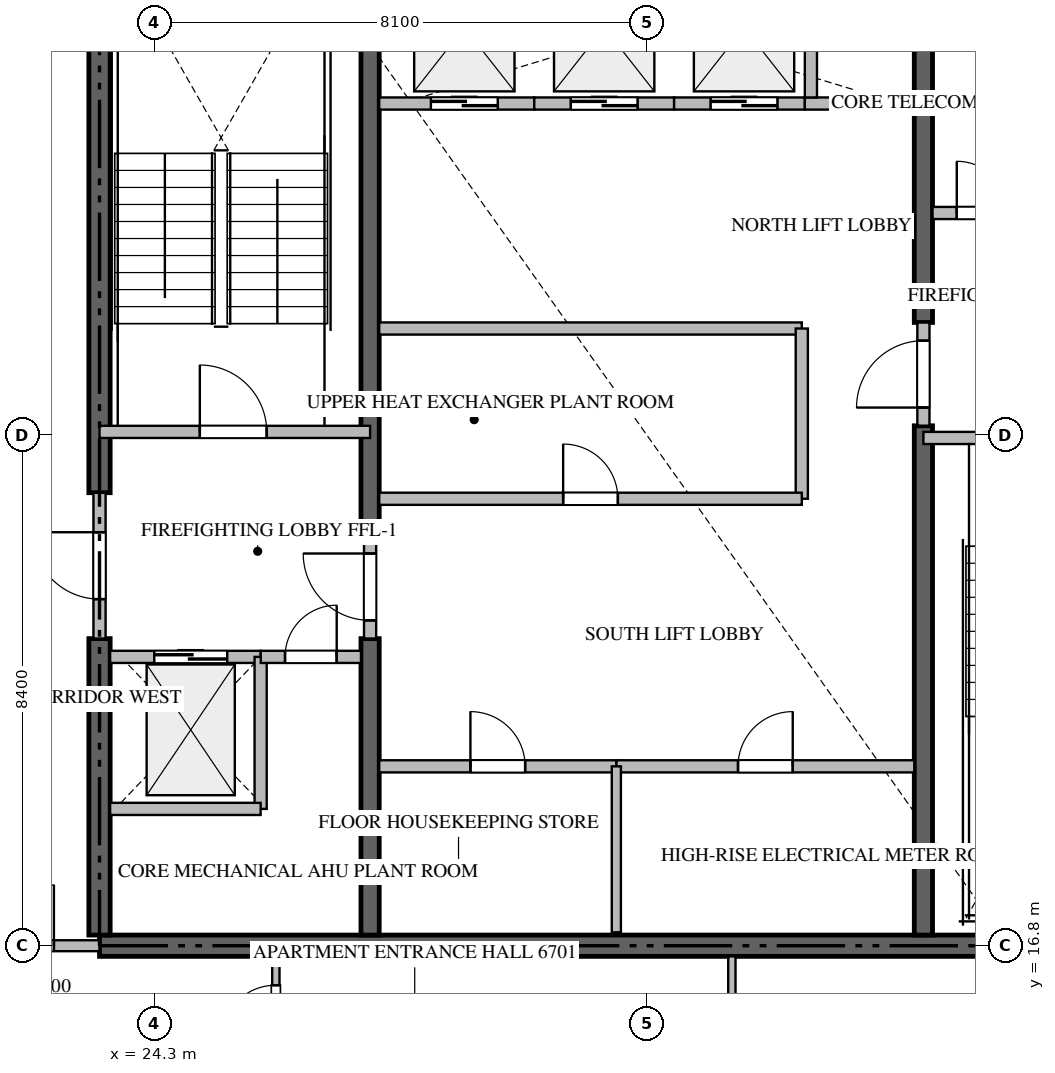
"""IFC4 building model, lengths in metres.
Left out: names, types, materials, properties, quantities, classifications, styles, units other than length and angle.
Written with IfcOpenShell. Run it as: python <this file> out.ifc"""

import sys

from ifc_helpers import new_model, si_unit, direction, frame, frame_2d, origin, place, context, subcontext, project, spatial, rectangle, extrude, source, transform, mapped, element, fill, save


model = new_model("IFC4")
c1 = context("Model", 3, precision=1e-05, world=origin(), true_north=direction((0.0, 1.0)))
c2 = subcontext(c1, "Body", "Model", "MODEL_VIEW")
j1 = project(units=[si_unit("LENGTHUNIT", "METRE"), si_unit("PLANEANGLEUNIT", "RADIAN")], contexts=[c1])
p1 = place(None, origin())
s1 = spatial("IfcSite", under=j1, at=p1, CompositionType="ELEMENT")
p2 = place(p1, origin())
s2 = spatial("IfcBuilding", under=s1, at=p2, CompositionType="ELEMENT")
p3 = place(p2, frame((0.0, 0.0, 268.2)))
s3 = spatial("IfcBuildingStorey", under=s2, at=p3, CompositionType="ELEMENT", Elevation=268.2)
p4 = place(p3, frame((23.4, 16.8, -0.26), z_axis=(0.0, 0.0, 1.0), x_axis=(1.0, 0.0, 0.0)))
e1 = element("IfcWall", 1, at=p4, inside=s3, PredefinedType="SHEAR", context=c2, shape_type="SweptSolid", body=[
    extrude(rectangle(XDim=18.0, YDim=0.35, at=frame_2d((9.0, 0.0))), origin(), (0.0, 0.0, 1.0), 3.848),
])
p5 = place(p3, frame((23.4, 16.975, -0.26), z_axis=(0.0, 0.0, 1.0), x_axis=(0.0, 1.0, 0.0)))
e2 = element("IfcWall", 2, at=p5, inside=s3, PredefinedType="SHEAR", context=c2, shape_type="SweptSolid", body=[
    extrude(rectangle(XDim=4.875, YDim=0.35, at=frame_2d((2.438, 0.0))), origin(), (0.0, 0.0, 1.0), 3.848),
])
p6 = place(p3, frame((23.4, 24.25, -0.26), z_axis=(0.0, 0.0, 1.0), x_axis=(0.0, 1.0, 0.0)))
e3 = element("IfcWall", 3, at=p6, inside=s3, PredefinedType="SHEAR", context=c2, shape_type="SweptSolid", body=[
    extrude(rectangle(XDim=9.175, YDim=0.35, at=frame_2d((4.587, 0.0))), origin(), (0.0, 0.0, 1.0), 3.848),
])
p7 = place(p3, frame((27.85, 16.975, -0.26), z_axis=(0.0, 0.0, 1.0), x_axis=(0.0, 1.0, 0.0)))
e4 = element("IfcWall", 4, at=p7, inside=s3, PredefinedType="SHEAR", context=c2, shape_type="SweptSolid", body=[
    extrude(rectangle(XDim=4.875, YDim=0.3, at=frame_2d((2.438, 0.0))), origin(), (0.0, 0.0, 1.0), 3.848),
])
p8 = place(p3, frame((27.85, 23.55, -0.26), z_axis=(0.0, 0.0, 1.0), x_axis=(0.0, 1.0, 0.0)))
e5 = element("IfcWall", 5, at=p8, inside=s3, PredefinedType="SHEAR", context=c2, shape_type="SweptSolid", body=[
    extrude(rectangle(XDim=9.875, YDim=0.3, at=frame_2d((4.938, 0.0))), origin(), (0.0, 0.0, 1.0), 3.848),
])
p9 = place(p3, frame((36.95, 16.975, -0.26), z_axis=(0.0, 0.0, 1.0), x_axis=(0.0, 1.0, 0.0)))
e6 = element("IfcWall", 6, at=p9, inside=s3, PredefinedType="SHEAR", context=c2, shape_type="SweptSolid", body=[
    extrude(rectangle(XDim=8.375, YDim=0.3, at=frame_2d((4.188, 0.0))), origin(), (0.0, 0.0, 1.0), 3.848),
])
p10 = place(p3, frame((36.95, 27.05, -0.26), z_axis=(0.0, 0.0, 1.0), x_axis=(0.0, 1.0, 0.0)))
e7 = element("IfcWall", 7, at=p10, inside=s3, PredefinedType="SHEAR", context=c2, shape_type="SweptSolid", body=[
    extrude(rectangle(XDim=6.375, YDim=0.3, at=frame_2d((3.188, 0.0))), origin(), (0.0, 0.0, 1.0), 3.848),
])
p11 = place(p3, frame((23.4, 25.25, 0.0), z_axis=(0.0, 0.0, 1.0), x_axis=(1.0, 0.0, 0.0)))
e8 = element("IfcWall", 8, at=p11, inside=s3, PredefinedType="STANDARD", context=c2, shape_type="SweptSolid", body=[
    extrude(rectangle(XDim=4.45, YDim=0.2, at=frame_2d((2.225, 0.0))), origin(), (0.0, 0.0, 1.0), 3.59),
])
p12 = place(p11, frame((1.65, 0.0, 0.0)))
e9 = element("IfcOpeningElement", 9, at=p12, cuts=e8, PredefinedType="OPENING", context=c2, shape_type="SweptSolid", body=[
    extrude(rectangle(XDim=1.1, YDim=2.15, at=frame_2d((0.55, 1.075))), frame((0.0, 0.11, 0.0), z_axis=(0.0, -1.0, 0.0), x_axis=(1.0, 0.0, 0.0)), (0.0, 0.0, 1.0), 0.22),
])
p13 = place(p3, frame((36.95, 25.15, 0.0), z_axis=(0.0, 0.0, 1.0), x_axis=(1.0, 0.0, 0.0)))
e10 = element("IfcWall", 10, at=p13, inside=s3, PredefinedType="STANDARD", context=c2, shape_type="SweptSolid", body=[
    extrude(rectangle(XDim=4.45, YDim=0.2, at=frame_2d((2.225, 0.0))), origin(), (0.0, 0.0, 1.0), 3.59),
])
p14 = place(p13, frame((1.65, 0.0, 0.0)))
e11 = element("IfcOpeningElement", 11, at=p14, cuts=e10, PredefinedType="OPENING", context=c2, shape_type="SweptSolid", body=[
    extrude(rectangle(XDim=1.1, YDim=2.15, at=frame_2d((0.55, 1.075))), frame((0.0, 0.11, 0.0), z_axis=(0.0, -1.0, 0.0), x_axis=(1.0, 0.0, 0.0)), (0.0, 0.0, 1.0), 0.22),
])
p15 = place(p3, frame((23.575, 21.55, 0.0), z_axis=(0.0, 0.0, 1.0), x_axis=(1.0, 0.0, 0.0)))
e12 = element("IfcWall", 12, at=p15, inside=s3, PredefinedType="STANDARD", context=c2, shape_type="SweptSolid", body=[
    extrude(rectangle(XDim=2.475, YDim=0.2, at=frame_2d((1.238, 0.0))), origin(), (0.0, 0.0, 1.0), 3.59),
])
p16 = place(p15, frame((0.725, 0.0, 0.0)))
e13 = element("IfcOpeningElement", 13, at=p16, cuts=e12, PredefinedType="OPENING", context=c2, shape_type="SweptSolid", body=[
    extrude(rectangle(XDim=1.2, YDim=2.2, at=frame_2d((0.6, 1.1))), frame((0.0, 0.11, 0.0), z_axis=(0.0, -1.0, 0.0), x_axis=(1.0, 0.0, 0.0)), (0.0, 0.0, 1.0), 0.22),
])
p17 = place(p3, frame((28.0, 30.65, 0.0), z_axis=(0.0, 0.0, 1.0), x_axis=(1.0, 0.0, 0.0)))
e14 = element("IfcWall", 14, at=p17, inside=s3, PredefinedType="STANDARD", context=c2, shape_type="SweptSolid", body=[
    extrude(rectangle(XDim=2.55, YDim=0.2, at=frame_2d((1.275, 0.0))), origin(), (0.0, 0.0, 1.0), 3.59),
])
p18 = place(p17, frame((0.85, 0.0, 0.0)))
e15 = element("IfcOpeningElement", 15, at=p18, cuts=e14, PredefinedType="OPENING", context=c2, shape_type="SweptSolid", body=[
    extrude(rectangle(XDim=1.1, YDim=2.2, at=frame_2d((0.55, 1.1))), frame((0.0, 0.11, 0.0), z_axis=(0.0, -1.0, 0.0), x_axis=(1.0, 0.0, 0.0)), (0.0, 0.0, 1.0), 0.22),
])
p19 = place(p3, frame((30.55, 30.65, 0.0), z_axis=(0.0, 0.0, 1.0), x_axis=(1.0, 0.0, 0.0)))
e16 = element("IfcWall", 16, at=p19, inside=s3, PredefinedType="STANDARD", context=c2, shape_type="SweptSolid", body=[
    extrude(rectangle(XDim=2.3, YDim=0.2, at=frame_2d((1.15, 0.0))), origin(), (0.0, 0.0, 1.0), 3.59),
])
p20 = place(p19, frame((0.6, 0.0, 0.0)))
e17 = element("IfcOpeningElement", 17, at=p20, cuts=e16, PredefinedType="OPENING", context=c2, shape_type="SweptSolid", body=[
    extrude(rectangle(XDim=1.1, YDim=2.2, at=frame_2d((0.55, 1.1))), frame((0.0, 0.11, 0.0), z_axis=(0.0, -1.0, 0.0), x_axis=(1.0, 0.0, 0.0)), (0.0, 0.0, 1.0), 0.22),
])
p21 = place(p3, frame((32.85, 30.65, 0.0), z_axis=(0.0, 0.0, 1.0), x_axis=(1.0, 0.0, 0.0)))
e18 = element("IfcWall", 18, at=p21, inside=s3, PredefinedType="STANDARD", context=c2, shape_type="SweptSolid", body=[
    extrude(rectangle(XDim=2.15, YDim=0.2, at=frame_2d((1.075, 0.0))), origin(), (0.0, 0.0, 1.0), 3.59),
])
p22 = place(p21, frame((0.6, 0.0, 0.0)))
e19 = element("IfcOpeningElement", 19, at=p22, cuts=e18, PredefinedType="OPENING", context=c2, shape_type="SweptSolid", body=[
    extrude(rectangle(XDim=1.1, YDim=2.2, at=frame_2d((0.55, 1.1))), frame((0.0, 0.11, 0.0), z_axis=(0.0, -1.0, 0.0), x_axis=(1.0, 0.0, 0.0)), (0.0, 0.0, 1.0), 0.22),
])
p23 = place(p3, frame((35.0, 30.65, 0.0), z_axis=(0.0, 0.0, 1.0), x_axis=(1.0, 0.0, 0.0)))
e20 = element("IfcWall", 20, at=p23, inside=s3, PredefinedType="STANDARD", context=c2, shape_type="SweptSolid", body=[
    extrude(rectangle(XDim=1.8, YDim=0.2, at=frame_2d((0.9, 0.0))), origin(), (0.0, 0.0, 1.0), 3.59),
])
p24 = place(p3, frame((35.1, 30.75, 0.0), z_axis=(0.0, 0.0, 1.0), x_axis=(0.0, 1.0, 0.0)))
e21 = element("IfcWall", 21, at=p24, inside=s3, PredefinedType="STANDARD", context=c2, shape_type="SweptSolid", body=[
    extrude(rectangle(XDim=2.675, YDim=0.2, at=frame_2d((1.337, 0.0))), origin(), (0.0, 0.0, 1.0), 3.59),
])
p25 = place(p3, frame((26.05, 19.05, 0.0), z_axis=(0.0, 0.0, 1.0), x_axis=(0.0, 1.0, 0.0)))
e22 = element("IfcWall", 22, at=p25, inside=s3, PredefinedType="STANDARD", context=c2, shape_type="SweptSolid", body=[
    extrude(rectangle(XDim=2.5, YDim=0.2, at=frame_2d((1.25, 0.0))), origin(), (0.0, 0.0, 1.0), 3.59),
])
p26 = place(p3, frame((23.575, 19.05, 0.0), z_axis=(0.0, 0.0, 1.0), x_axis=(1.0, 0.0, 0.0)))
e23 = element("IfcWall", 23, at=p26, inside=s3, PredefinedType="STANDARD", context=c2, shape_type="SweptSolid", body=[
    extrude(rectangle(XDim=2.475, YDim=0.2, at=frame_2d((1.238, 0.0))), origin(), (0.0, 0.0, 1.0), 3.59),
])
p27 = place(p3, frame((26.052, 21.55, 0.0), z_axis=(0.0, 0.0, 1.0), x_axis=(1.0, 0.0, 0.0)))
e24 = element("IfcWall", 24, at=p27, inside=s3, PredefinedType="STANDARD", context=c2, shape_type="SweptSolid", body=[
    extrude(rectangle(XDim=1.648, YDim=0.2, at=frame_2d((0.824, 0.0))), origin(), (0.0, 0.0, 1.0), 3.59),
])
p28 = place(p27, frame((0.399, 0.0, 0.0)))
e25 = element("IfcOpeningElement", 25, at=p28, cuts=e24, PredefinedType="OPENING", context=c2, shape_type="SweptSolid", body=[
    extrude(rectangle(XDim=0.85, YDim=2.1, at=frame_2d((0.425, 1.05))), frame((0.0, 0.11, 0.0), z_axis=(0.0, -1.0, 0.0), x_axis=(1.0, 0.0, 0.0)), (0.0, 0.0, 1.0), 0.22),
])
p29 = place(p3, frame((37.1, 28.85, 0.0), z_axis=(0.0, 0.0, 1.0), x_axis=(1.0, 0.0, 0.0)))
e26 = element("IfcWall", 26, at=p29, inside=s3, PredefinedType="STANDARD", context=c2, shape_type="SweptSolid", body=[
    extrude(rectangle(XDim=1.648, YDim=0.2, at=frame_2d((0.824, 0.0))), origin(), (0.0, 0.0, 1.0), 3.59),
])
p30 = place(p29, frame((0.399, 0.0, 0.0)))
e27 = element("IfcOpeningElement", 27, at=p30, cuts=e26, PredefinedType="OPENING", context=c2, shape_type="SweptSolid", body=[
    extrude(rectangle(XDim=0.85, YDim=2.1, at=frame_2d((0.425, 1.05))), frame((0.0, 0.11, 0.0), z_axis=(0.0, -1.0, 0.0), x_axis=(1.0, 0.0, 0.0)), (0.0, 0.0, 1.0), 0.22),
])
p31 = place(p3, frame((23.4, 21.852, 0.0), z_axis=(0.0, 0.0, 1.0), x_axis=(0.0, 1.0, 0.0)))
e28 = element("IfcWall", 28, at=p31, inside=s3, PredefinedType="STANDARD", context=c2, shape_type="SweptSolid", body=[
    extrude(rectangle(XDim=2.396, YDim=0.2, at=frame_2d((1.198, 0.0))), origin(), (0.0, 0.0, 1.0), 3.59),
])
p32 = place(p31, frame((0.648, 0.0, 0.0)))
e29 = element("IfcOpeningElement", 29, at=p32, cuts=e28, PredefinedType="OPENING", context=c2, shape_type="SweptSolid", body=[
    extrude(rectangle(XDim=1.1, YDim=2.15, at=frame_2d((0.55, 1.075))), frame((0.0, 0.11, 0.0), z_axis=(0.0, -1.0, 0.0), x_axis=(1.0, 0.0, 0.0)), (0.0, 0.0, 1.0), 0.22),
])
p33 = place(p3, frame((27.85, 21.852, 0.0), z_axis=(0.0, 0.0, 1.0), x_axis=(0.0, 1.0, 0.0)))
e30 = element("IfcWall", 30, at=p33, inside=s3, PredefinedType="STANDARD", context=c2, shape_type="SweptSolid", body=[
    extrude(rectangle(XDim=1.696, YDim=0.2, at=frame_2d((0.848, 0.0))), origin(), (0.0, 0.0, 1.0), 3.59),
])
p34 = place(p33, frame((0.298, 0.0, 0.0)))
e31 = element("IfcOpeningElement", 31, at=p34, cuts=e30, PredefinedType="OPENING", context=c2, shape_type="SweptSolid", body=[
    extrude(rectangle(XDim=1.1, YDim=2.15, at=frame_2d((0.55, 1.075))), frame((0.0, 0.11, 0.0), z_axis=(0.0, -1.0, 0.0), x_axis=(1.0, 0.0, 0.0)), (0.0, 0.0, 1.0), 0.22),
])
p35 = place(p3, frame((36.95, 25.352, 0.0), z_axis=(0.0, 0.0, 1.0), x_axis=(0.0, 1.0, 0.0)))
e32 = element("IfcWall", 32, at=p35, inside=s3, PredefinedType="STANDARD", context=c2, shape_type="SweptSolid", body=[
    extrude(rectangle(XDim=1.696, YDim=0.2, at=frame_2d((0.848, 0.0))), origin(), (0.0, 0.0, 1.0), 3.59),
])
p36 = place(p35, frame((0.298, 0.0, 0.0)))
e33 = element("IfcOpeningElement", 33, at=p36, cuts=e32, PredefinedType="OPENING", context=c2, shape_type="SweptSolid", body=[
    extrude(rectangle(XDim=1.1, YDim=2.15, at=frame_2d((0.55, 1.075))), frame((0.0, 0.11, 0.0), z_axis=(0.0, -1.0, 0.0), x_axis=(1.0, 0.0, 0.0)), (0.0, 0.0, 1.0), 0.22),
])
p37 = place(p3, frame((28.0, 19.75, 0.0), z_axis=(0.0, 0.0, 1.0), x_axis=(1.0, 0.0, 0.0)))
e34 = element("IfcWall", 34, at=p37, inside=s3, PredefinedType="STANDARD", context=c2, shape_type="SweptSolid", body=[
    extrude(rectangle(XDim=3.9, YDim=0.2, at=frame_2d((1.95, 0.0))), origin(), (0.0, 0.0, 1.0), 3.59),
])
p38 = place(p37, frame((1.5, 0.0, 0.0)))
e35 = element("IfcOpeningElement", 35, at=p38, cuts=e34, PredefinedType="OPENING", context=c2, shape_type="SweptSolid", body=[
    extrude(rectangle(XDim=0.9, YDim=2.1, at=frame_2d((0.45, 1.05))), frame((0.0, 0.11, 0.0), z_axis=(0.0, -1.0, 0.0), x_axis=(1.0, 0.0, 0.0)), (0.0, 0.0, 1.0), 0.22),
])
p39 = place(p3, frame((31.902, 19.75, 0.0), z_axis=(0.0, 0.0, 1.0), x_axis=(1.0, 0.0, 0.0)))
e36 = element("IfcWall", 36, at=p39, inside=s3, PredefinedType="STANDARD", context=c2, shape_type="SweptSolid", body=[
    extrude(rectangle(XDim=4.898, YDim=0.2, at=frame_2d((2.449, 0.0))), origin(), (0.0, 0.0, 1.0), 3.59),
])
p40 = place(p39, frame((1.999, 0.0, 0.0)))
e37 = element("IfcOpeningElement", 37, at=p40, cuts=e36, PredefinedType="OPENING", context=c2, shape_type="SweptSolid", body=[
    extrude(rectangle(XDim=0.9, YDim=2.1, at=frame_2d((0.45, 1.05))), frame((0.0, 0.11, 0.0), z_axis=(0.0, -1.0, 0.0), x_axis=(1.0, 0.0, 0.0)), (0.0, 0.0, 1.0), 0.22),
])
p41 = place(p3, frame((31.9, 17.02, 0.0), z_axis=(0.0, 0.0, 1.0), x_axis=(0.0, 1.0, 0.0)))
e38 = element("IfcWall", 38, at=p41, inside=s3, PredefinedType="PARTITIONING", context=c2, shape_type="SweptSolid", body=[
    extrude(rectangle(XDim=2.73, YDim=0.15, at=frame_2d((1.365, 0.0))), origin(), (0.0, 0.0, 1.0), 3.59),
])
p42 = place(p3, frame((28.0, 26.95, 0.0), z_axis=(0.0, 0.0, 1.0), x_axis=(1.0, 0.0, 0.0)))
e39 = element("IfcWall", 39, at=p42, inside=s3, PredefinedType="STANDARD", context=c2, shape_type="SweptSolid", body=[
    extrude(rectangle(XDim=6.95, YDim=0.2, at=frame_2d((3.475, 0.0))), origin(), (0.0, 0.0, 1.0), 3.59),
])
p43 = place(p3, frame((34.95, 24.15, 0.0), z_axis=(0.0, 0.0, 1.0), x_axis=(0.0, 1.0, 0.0)))
e40 = element("IfcWall", 40, at=p43, inside=s3, PredefinedType="STANDARD", context=c2, shape_type="SweptSolid", body=[
    extrude(rectangle(XDim=2.8, YDim=0.2, at=frame_2d((1.4, 0.0))), origin(), (0.0, 0.0, 1.0), 3.59),
])
p44 = place(p3, frame((28.0, 24.15, 0.0), z_axis=(0.0, 0.0, 1.0), x_axis=(1.0, 0.0, 0.0)))
e41 = element("IfcWall", 41, at=p44, inside=s3, PredefinedType="STANDARD", context=c2, shape_type="SweptSolid", body=[
    extrude(rectangle(XDim=6.95, YDim=0.2, at=frame_2d((3.475, 0.0))), origin(), (0.0, 0.0, 1.0), 3.59),
])
p45 = place(p44, frame((3.025, 0.0, 0.0)))
e42 = element("IfcOpeningElement", 42, at=p45, cuts=e41, PredefinedType="OPENING", context=c2, shape_type="SweptSolid", body=[
    extrude(rectangle(XDim=0.9, YDim=2.1, at=frame_2d((0.45, 1.05))), frame((0.0, 0.11, 0.0), z_axis=(0.0, -1.0, 0.0), x_axis=(1.0, 0.0, 0.0)), (0.0, 0.0, 1.0), 0.22),
])
p46 = place(p3, frame((20.902, 16.8, 0.0), z_axis=(0.0, 0.0, 1.0), x_axis=(1.0, 0.0, 0.0)))
e43 = element("IfcWall", 43, at=p46, inside=s3, PredefinedType="PARTITIONING", context=c2, shape_type="SweptSolid", body=[
    extrude(rectangle(XDim=2.496, YDim=0.18, at=frame_2d((1.248, 0.0))), origin(), (0.0, 0.0, 1.0), 3.59),
])
p47 = place(p46, frame((0.748, 0.0, 0.0)))
e44 = element("IfcOpeningElement", 44, at=p47, cuts=e43, PredefinedType="OPENING", context=c2, shape_type="SweptSolid", body=[
    extrude(rectangle(XDim=1.0, YDim=2.15, at=frame_2d((0.5, 1.075))), frame((0.0, 0.1, 0.0), z_axis=(0.0, -1.0, 0.0), x_axis=(1.0, 0.0, 0.0)), (0.0, 0.0, 1.0), 0.2),
])
p48 = place(p3, frame((26.3, 14.65, 0.0), z_axis=(0.0, 0.0, 1.0), x_axis=(0.0, 1.0, 0.0)))
e45 = element("IfcWall", 45, at=p48, inside=s3, PredefinedType="PARTITIONING", context=c2, shape_type="SweptSolid", body=[
    extrude(rectangle(XDim=1.975, YDim=0.12, at=frame_2d((0.988, 0.0))), origin(), (0.0, 0.0, 1.0), 3.59),
])
p49 = place(p48, frame((0.601, 0.0, 0.0)))
e46 = element("IfcOpeningElement", 46, at=p49, cuts=e45, PredefinedType="OPENING", context=c2, shape_type="SweptSolid", body=[
    extrude(rectangle(XDim=0.9, YDim=2.1, at=frame_2d((0.45, 1.05))), frame((0.0, 0.07, 0.0), z_axis=(0.0, -1.0, 0.0), x_axis=(1.0, 0.0, 0.0)), (0.0, 0.0, 1.0), 0.14),
])
p50 = place(p3, frame((33.8, 14.652, 0.0), z_axis=(0.0, 0.0, 1.0), x_axis=(0.0, 1.0, 0.0)))
e47 = element("IfcWall", 47, at=p50, inside=s3, PredefinedType="PARTITIONING", context=c2, shape_type="SweptSolid", body=[
    extrude(rectangle(XDim=1.973, YDim=0.12, at=frame_2d((0.986, 0.0))), origin(), (0.0, 0.0, 1.0), 3.59),
])
m1 = source(origin(), c2, "Body", "SweptSolid", [
    extrude(rectangle(XDim=1.1, YDim=2.15, at=frame_2d((0.55, 1.075))), frame((0.0, 0.025, 0.0), z_axis=(0.0, -1.0, 0.0), x_axis=(1.0, 0.0, 0.0)), (0.0, 0.0, 1.0), 0.05),
])
p51 = place(p12, origin())
e48 = element("IfcDoor", 48, at=p51, inside=s3, OperationType="SINGLE_SWING_LEFT", PredefinedType="DOOR", context=c2, shape_type="MappedRepresentation", body=[
    mapped(m1, transform((0.0, 0.0, 0.0), scale=1.0)),
])
fill(e9, e48)
m2 = source(origin(), c2, "Body", "SweptSolid", [
    extrude(rectangle(XDim=1.2, YDim=2.2, at=frame_2d((0.6, 1.1))), frame((0.0, 0.025, 0.0), z_axis=(0.0, -1.0, 0.0), x_axis=(1.0, 0.0, 0.0)), (0.0, 0.0, 1.0), 0.05),
])
p52 = place(p16, origin())
e49 = element("IfcDoor", 49, at=p52, inside=s3, OperationType="DOUBLE_DOOR_SLIDING", PredefinedType="DOOR", context=c2, shape_type="MappedRepresentation", body=[
    mapped(m2, transform((0.0, 0.0, 0.0), scale=1.0)),
])
fill(e13, e49)
m3 = source(origin(), c2, "Body", "SweptSolid", [
    extrude(rectangle(XDim=1.1, YDim=2.2, at=frame_2d((0.55, 1.1))), frame((0.0, 0.025, 0.0), z_axis=(0.0, -1.0, 0.0), x_axis=(1.0, 0.0, 0.0)), (0.0, 0.0, 1.0), 0.05),
])
p53 = place(p18, origin())
e50 = element("IfcDoor", 50, at=p53, inside=s3, OperationType="DOUBLE_DOOR_SLIDING", PredefinedType="DOOR", context=c2, shape_type="MappedRepresentation", body=[
    mapped(m3, transform((0.0, 0.0, 0.0), scale=1.0)),
])
fill(e15, e50)
p54 = place(p20, origin())
e51 = element("IfcDoor", 51, at=p54, inside=s3, OperationType="DOUBLE_DOOR_SLIDING", PredefinedType="DOOR", context=c2, shape_type="MappedRepresentation", body=[
    mapped(m3, transform((0.0, 0.0, 0.0), scale=1.0)),
])
fill(e17, e51)
p55 = place(p22, origin())
e52 = element("IfcDoor", 52, at=p55, inside=s3, OperationType="DOUBLE_DOOR_SLIDING", PredefinedType="DOOR", context=c2, shape_type="MappedRepresentation", body=[
    mapped(m3, transform((0.0, 0.0, 0.0), scale=1.0)),
])
fill(e19, e52)
m4 = source(origin(), c2, "Body", "SweptSolid", [
    extrude(rectangle(XDim=0.85, YDim=2.1, at=frame_2d((0.425, 1.05))), frame((0.0, 0.025, 0.0), z_axis=(0.0, -1.0, 0.0), x_axis=(1.0, 0.0, 0.0)), (0.0, 0.0, 1.0), 0.05),
])
p56 = place(p28, origin())
e53 = element("IfcDoor", 53, at=p56, inside=s3, OperationType="SINGLE_SWING_RIGHT", PredefinedType="DOOR", context=c2, shape_type="MappedRepresentation", body=[
    mapped(m4, transform((0.0, 0.0, 0.0), scale=1.0)),
])
fill(e25, e53)
p57 = place(p30, origin())
e54 = element("IfcDoor", 54, at=p57, inside=s3, OperationType="SINGLE_SWING_LEFT", PredefinedType="DOOR", context=c2, shape_type="MappedRepresentation", body=[
    mapped(m4, transform((0.0, 0.0, 0.0), scale=1.0)),
])
fill(e27, e54)
p58 = place(p32, origin())
e55 = element("IfcDoor", 55, at=p58, inside=s3, OperationType="SINGLE_SWING_RIGHT", PredefinedType="DOOR", context=c2, shape_type="MappedRepresentation", body=[
    mapped(m1, transform((0.0, 0.0, 0.0), scale=1.0)),
])
fill(e29, e55)
p59 = place(p34, origin())
e56 = element("IfcDoor", 56, at=p59, inside=s3, OperationType="SINGLE_SWING_RIGHT", PredefinedType="DOOR", context=c2, shape_type="MappedRepresentation", body=[
    mapped(m1, transform((0.0, 0.0, 0.0), scale=1.0)),
])
fill(e31, e56)
p60 = place(p36, origin())
e57 = element("IfcDoor", 57, at=p60, inside=s3, OperationType="SINGLE_SWING_LEFT", PredefinedType="DOOR", context=c2, shape_type="MappedRepresentation", body=[
    mapped(m1, transform((0.0, 0.0, 0.0), scale=1.0)),
])
fill(e33, e57)
m5 = source(origin(), c2, "Body", "SweptSolid", [
    extrude(rectangle(XDim=0.9, YDim=2.1, at=frame_2d((0.45, 1.05))), frame((0.0, 0.025, 0.0), z_axis=(0.0, -1.0, 0.0), x_axis=(1.0, 0.0, 0.0)), (0.0, 0.0, 1.0), 0.05),
])
p61 = place(p38, origin())
e58 = element("IfcDoor", 58, at=p61, inside=s3, OperationType="SINGLE_SWING_LEFT", PredefinedType="DOOR", context=c2, shape_type="MappedRepresentation", body=[
    mapped(m5, transform((0.0, 0.0, 0.0), scale=1.0)),
])
fill(e35, e58)
p62 = place(p40, origin())
e59 = element("IfcDoor", 59, at=p62, inside=s3, OperationType="SINGLE_SWING_RIGHT", PredefinedType="DOOR", context=c2, shape_type="MappedRepresentation", body=[
    mapped(m5, transform((0.0, 0.0, 0.0), scale=1.0)),
])
fill(e37, e59)
p63 = place(p45, origin())
e60 = element("IfcDoor", 60, at=p63, inside=s3, OperationType="SINGLE_SWING_LEFT", PredefinedType="DOOR", context=c2, shape_type="MappedRepresentation", body=[
    mapped(m5, transform((0.0, 0.0, 0.0), scale=1.0)),
])
fill(e42, e60)
m6 = source(origin(), c2, "Body", "SweptSolid", [
    extrude(rectangle(XDim=1.0, YDim=2.15, at=frame_2d((0.5, 1.075))), frame((0.0, 0.025, 0.0), z_axis=(0.0, -1.0, 0.0), x_axis=(1.0, 0.0, 0.0)), (0.0, 0.0, 1.0), 0.05),
])
p64 = place(p47, origin())
e61 = element("IfcDoor", 61, at=p64, inside=s3, OperationType="SINGLE_SWING_RIGHT", PredefinedType="DOOR", context=c2, shape_type="MappedRepresentation", body=[
    mapped(m6, transform((0.0, 0.0, 0.0), scale=1.0)),
])
fill(e44, e61)
p65 = place(p49, origin())
e62 = element("IfcDoor", 62, at=p65, inside=s3, OperationType="SINGLE_SWING_LEFT", PredefinedType="DOOR", context=c2, shape_type="MappedRepresentation", body=[
    mapped(m5, transform((0.0, 0.0, 0.0), scale=1.0)),
])
fill(e46, e62)
save(model, sys.argv[1])
